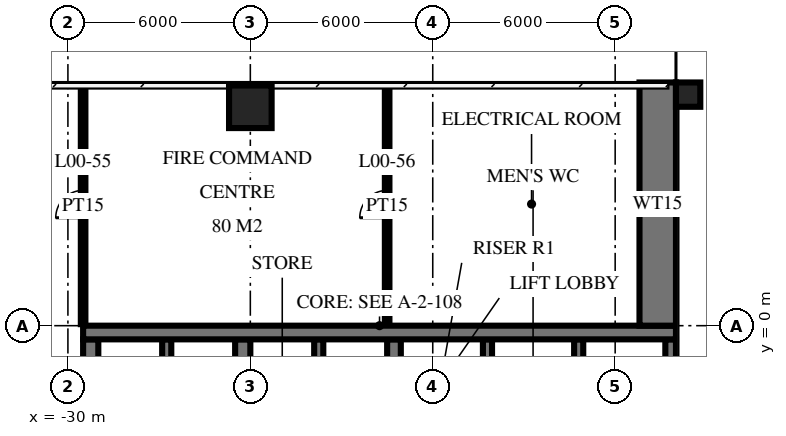
"""IFC4 building model, lengths in metres.
Left out: names, types, materials, properties, quantities, classifications, styles, units other than length and angle.
Written with IfcOpenShell. Run it as: python <this file> out.ifc"""

import sys

from ifc_helpers import new_model, si_unit, direction, frame, frame_2d, origin, origin_2d, place, context, subcontext, project, spatial, rectangle, circle, extrude, element, fill, save


model = new_model("IFC4")
c1 = context("Model", 3, precision=1e-05, world=origin(), true_north=direction((0.0, 1.0)))
c2 = subcontext(c1, "Body", "Model", "MODEL_VIEW")
j1 = project(units=[si_unit("LENGTHUNIT", "METRE"), si_unit("PLANEANGLEUNIT", "RADIAN")], contexts=[c1])
p1 = place(None, origin())
s1 = spatial("IfcSite", under=j1, at=p1, CompositionType="ELEMENT")
p2 = place(p1, origin())
s2 = spatial("IfcBuilding", under=s1, at=p2, CompositionType="ELEMENT")
p3 = place(p2, origin())
s3 = spatial("IfcBuildingStorey", under=s2, at=p3, CompositionType="ELEMENT", Elevation=0.0)
p4 = place(p3, frame((-24.0, 7.2, -0.3), z_axis=(0.0, 0.0, 1.0), x_axis=(1.0, 0.0, 0.0)))
e1 = element("IfcColumn", 1, at=p4, inside=s3, PredefinedType="COLUMN", context=c2, shape_type="SweptSolid", body=[
    extrude(circle(Radius=0.7, at=origin_2d()), origin(), (0.0, 0.0, 1.0), 7.3),
])
p5 = place(p3, frame((-29.5, -0.225, -0.3), z_axis=(0.0, 0.0, 1.0), x_axis=(1.0, 0.0, 0.0)))
e2 = element("IfcWall", 2, at=p5, inside=s3, PredefinedType="SHEAR", context=c2, shape_type="SweptSolid", body=[
    extrude(rectangle(XDim=19.5, YDim=0.45, at=frame_2d((9.75, 0.0))), origin(), (0.0, 0.0, 1.0), 7.3),
])
p6 = place(p3, frame((-10.175, -14.55, -0.3), z_axis=(0.0, 0.0, 1.0), x_axis=(0.0, 1.0, 0.0)))
e3 = element("IfcWall", 3, at=p6, inside=s3, PredefinedType="SHEAR", context=c2, shape_type="SweptSolid", body=[
    extrude(rectangle(XDim=14.1, YDim=0.35, at=frame_2d((7.05, 0.0))), origin(), (0.0, 0.0, 1.0), 7.3),
])
p7 = place(p6, frame((8.4, 0.0, 0.3)))
e4 = element("IfcOpeningElement", 4, at=p7, cuts=e3, PredefinedType="OPENING", context=c2, shape_type="SweptSolid", body=[
    extrude(rectangle(XDim=1.4, YDim=2.4, at=frame_2d((0.7, 1.2))), frame((0.0, 0.185, 0.0), z_axis=(0.0, -1.0, 0.0), x_axis=(1.0, 0.0, 0.0)), (0.0, 0.0, 1.0), 0.37),
])
p8 = place(p6, frame((10.0, 0.0, 0.3)))
e5 = element("IfcOpeningElement", 5, at=p8, cuts=e3, PredefinedType="OPENING", context=c2, shape_type="SweptSolid", body=[
    extrude(rectangle(XDim=1.4, YDim=2.4, at=frame_2d((0.7, 1.2))), frame((0.0, 0.185, 0.0), z_axis=(0.0, -1.0, 0.0), x_axis=(1.0, 0.0, 0.0)), (0.0, 0.0, 1.0), 0.37),
])
p9 = place(p6, frame((4.0, 0.0, 0.3)))
e6 = element("IfcOpeningElement", 6, at=p9, cuts=e3, PredefinedType="OPENING", context=c2, shape_type="SweptSolid", body=[
    extrude(rectangle(XDim=1.2, YDim=2.1, at=frame_2d((0.6, 1.05))), frame((0.0, 0.185, 0.0), z_axis=(0.0, -1.0, 0.0), x_axis=(1.0, 0.0, 0.0)), (0.0, 0.0, 1.0), 0.37),
])
p10 = place(p3, frame((-29.25, -14.55, -0.3), z_axis=(0.0, 0.0, 1.0), x_axis=(0.0, 1.0, 0.0)))
e7 = element("IfcWall", 7, at=p10, inside=s3, PredefinedType="SHEAR", context=c2, shape_type="SweptSolid", body=[
    extrude(rectangle(XDim=14.1, YDim=0.5, at=frame_2d((7.05, 0.0))), origin(), (0.0, 0.0, 1.0), 7.3),
])
for number, where, z_axis, x_axis in (
    (8, (-13.2, -2.75, -0.3), (0.0, 0.0, 1.0), (0.0, 1.0, 0.0)),
    (9, (-16.2, -2.75, -0.3), (0.0, 0.0, 1.0), (0.0, 1.0, 0.0)),
):
    element("IfcWall", number, at=place(p3, frame(where, z_axis=z_axis, x_axis=x_axis)), inside=s3, PredefinedType="SHEAR", context=c2, shape_type="SweptSolid", body=[
        extrude(rectangle(XDim=2.3, YDim=0.3, at=frame_2d((1.15, 0.0))), origin(), (0.0, 0.0, 1.0), 7.3),
    ])
p11 = place(p3, frame((-19.275, -2.75, -0.3), z_axis=(0.0, 0.0, 1.0), x_axis=(0.0, 1.0, 0.0)))
e10 = element("IfcWall", 10, at=p11, inside=s3, PredefinedType="SHEAR", context=c2, shape_type="SweptSolid", body=[
    extrude(rectangle(XDim=2.3, YDim=0.45, at=frame_2d((1.15, 0.0))), origin(), (0.0, 0.0, 1.0), 7.3),
])
p12 = place(p3, frame((-21.75, -2.75, -0.3), z_axis=(0.0, 0.0, 1.0), x_axis=(0.0, 1.0, 0.0)))
e11 = element("IfcWall", 11, at=p12, inside=s3, PredefinedType="SHEAR", context=c2, shape_type="SweptSolid", body=[
    extrude(rectangle(XDim=2.3, YDim=0.3, at=frame_2d((1.15, 0.0))), origin(), (0.0, 0.0, 1.0), 7.3),
])
p13 = place(p3, frame((-24.25, -2.75, -0.3), z_axis=(0.0, 0.0, 1.0), x_axis=(0.0, 1.0, 0.0)))
e12 = element("IfcWall", 12, at=p13, inside=s3, PredefinedType="SHEAR", context=c2, shape_type="SweptSolid", body=[
    extrude(rectangle(XDim=2.3, YDim=0.5, at=frame_2d((1.15, 0.0))), origin(), (0.0, 0.0, 1.0), 7.3),
])
p14 = place(p3, frame((-26.75, -2.75, -0.3), z_axis=(0.0, 0.0, 1.0), x_axis=(0.0, 1.0, 0.0)))
e13 = element("IfcWall", 13, at=p14, inside=s3, PredefinedType="SHEAR", context=c2, shape_type="SweptSolid", body=[
    extrude(rectangle(XDim=2.3, YDim=0.3, at=frame_2d((1.15, 0.0))), origin(), (0.0, 0.0, 1.0), 7.3),
])
p15 = place(p3, frame((-10.6, 0.0, -0.3), z_axis=(0.0, 0.0, 1.0), x_axis=(0.0, 1.0, 0.0)))
e14 = element("IfcWall", 14, at=p15, inside=s3, PredefinedType="SHEAR", context=c2, shape_type="SweptSolid", body=[
    extrude(rectangle(XDim=8.0, YDim=1.2, at=frame_2d((4.0, 0.0))), origin(), (0.0, 0.0, 1.0), 7.3),
])
p16 = place(p3, frame((-9.6, 7.6, -0.3), z_axis=(0.0, 0.0, 1.0), x_axis=(1.0, 0.0, 0.0)))
e15 = element("IfcColumn", 15, at=p16, inside=s3, PredefinedType="COLUMN", context=c2, shape_type="SweptSolid", body=[
    extrude(rectangle(XDim=0.8, YDim=0.8, at=origin_2d()), origin(), (0.0, 0.0, 1.0), 7.3),
])
p17 = place(p3, frame((-19.5, 0.05, 0.0), z_axis=(0.0, 0.0, 1.0), x_axis=(0.0, 1.0, 0.0)))
e16 = element("IfcWall", 16, at=p17, inside=s3, PredefinedType="PARTITIONING", context=c2, shape_type="SweptSolid", body=[
    extrude(rectangle(XDim=7.77, YDim=0.15, at=frame_2d((3.885, 0.0))), origin(), (0.0, 0.0, 1.0), 6.55),
])
p18 = place(p17, frame((3.5, 0.0, 0.0)))
e17 = element("IfcOpeningElement", 17, at=p18, cuts=e16, PredefinedType="OPENING", context=c2, shape_type="SweptSolid", body=[
    extrude(rectangle(XDim=0.9, YDim=2.1, at=frame_2d((0.45, 1.05))), frame((0.0, 0.085, 0.0), z_axis=(0.0, -1.0, 0.0), x_axis=(1.0, 0.0, 0.0)), (0.0, 0.0, 1.0), 0.17),
])
p19 = place(p3, frame((-29.5, 0.05, 0.0), z_axis=(0.0, 0.0, 1.0), x_axis=(0.0, 1.0, 0.0)))
e18 = element("IfcWall", 18, at=p19, inside=s3, PredefinedType="PARTITIONING", context=c2, shape_type="SweptSolid", body=[
    extrude(rectangle(XDim=7.77, YDim=0.15, at=frame_2d((3.885, 0.0))), origin(), (0.0, 0.0, 1.0), 6.55),
])
p20 = place(p19, frame((3.5, 0.0, 0.0)))
e19 = element("IfcOpeningElement", 19, at=p20, cuts=e18, PredefinedType="OPENING", context=c2, shape_type="SweptSolid", body=[
    extrude(rectangle(XDim=0.9, YDim=2.1, at=frame_2d((0.45, 1.05))), frame((0.0, 0.085, 0.0), z_axis=(0.0, -1.0, 0.0), x_axis=(1.0, 0.0, 0.0)), (0.0, 0.0, 1.0), 0.17),
])
p21 = place(p20, origin())
e20 = element("IfcDoor", 20, at=p21, inside=s3, OperationType="SINGLE_SWING_RIGHT", PredefinedType="DOOR", context=c2, shape_type="SweptSolid", body=[
    extrude(rectangle(XDim=0.9, YDim=2.1, at=frame_2d((0.45, 1.05))), frame((0.0, 0.025, 0.0), z_axis=(0.0, -1.0, 0.0), x_axis=(1.0, 0.0, 0.0)), (0.0, 0.0, 1.0), 0.05),
])
fill(e19, e20)
p22 = place(p18, origin())
e21 = element("IfcDoor", 21, at=p22, inside=s3, OperationType="SINGLE_SWING_RIGHT", PredefinedType="DOOR", context=c2, shape_type="SweptSolid", body=[
    extrude(rectangle(XDim=0.9, YDim=2.1, at=frame_2d((0.45, 1.05))), frame((0.0, 0.025, 0.0), z_axis=(0.0, -1.0, 0.0), x_axis=(1.0, 0.0, 0.0)), (0.0, 0.0, 1.0), 0.05),
])
fill(e17, e21)
save(model, sys.argv[1])
